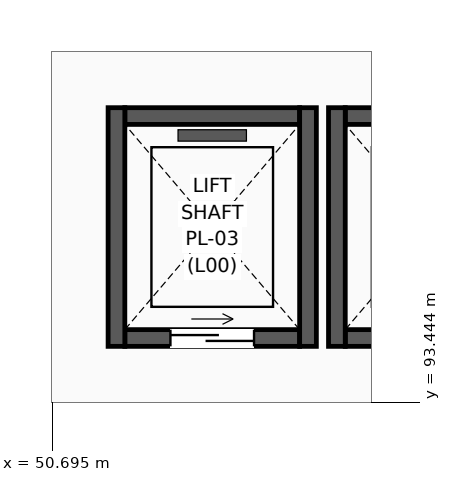
"""IFC4 building model, lengths in metres.
Left out: names, types, materials, properties, quantities, classifications, styles, units other than length and angle.
Written with IfcOpenShell. Run it as: python <this file> out.ifc"""

import sys

from ifc_helpers import new_model, si_unit, direction, frame, frame_2d, origin, place, context, subcontext, project, spatial, rectangle, extrude, element, fill, save


model = new_model("IFC4")
c1 = context("Model", 3, precision=1e-05, world=origin(), true_north=direction((0.0, 1.0)))
c2 = subcontext(c1, "Body", "Model", "MODEL_VIEW")
j1 = project(units=[si_unit("LENGTHUNIT", "METRE"), si_unit("PLANEANGLEUNIT", "RADIAN")], contexts=[c1])
p1 = place(None, origin())
s1 = spatial("IfcSite", under=j1, at=p1, CompositionType="ELEMENT")
p2 = place(p1, origin())
s2 = spatial("IfcBuilding", under=s1, at=p2, CompositionType="ELEMENT")
p3 = place(p2, origin())
s3 = spatial("IfcBuildingStorey", under=s2, at=p3, CompositionType="ELEMENT", Elevation=0.0)
p4 = place(p3, frame((51.65, 94.29, 0.0), z_axis=(0.0, 0.0, 1.0), x_axis=(1.0, 0.0, 0.0)))
e1 = element("IfcWall", 1, at=p4, inside=s3, PredefinedType="SOLIDWALL", context=c2, shape_type="SweptSolid", body=[
    extrude(rectangle(XDim=2.3, YDim=0.22, at=frame_2d((1.15, 0.0))), origin(), (0.0, 0.0, 1.0), 5.105),
])
p5 = place(p4, frame((0.6, 0.0, 0.0)))
e2 = element("IfcOpeningElement", 2, at=p5, cuts=e1, PredefinedType="OPENING", context=c2, shape_type="SweptSolid", body=[
    extrude(rectangle(XDim=1.1, YDim=2.2, at=frame_2d((0.55, 1.1))), frame((0.0, 0.12, 0.0), z_axis=(0.0, -1.0, 0.0), x_axis=(1.0, 0.0, 0.0)), (0.0, 0.0, 1.0), 0.24),
])
p6 = place(p3, frame((51.65, 97.21, 0.0), z_axis=(0.0, 0.0, 1.0), x_axis=(1.0, 0.0, 0.0)))
e3 = element("IfcWall", 3, at=p6, inside=s3, PredefinedType="SOLIDWALL", context=c2, shape_type="SweptSolid", body=[
    extrude(rectangle(XDim=2.3, YDim=0.22, at=frame_2d((1.15, 0.0))), origin(), (0.0, 0.0, 1.0), 5.105),
])
for number, where, z_axis, x_axis in (
    (4, (51.54, 94.18, 0.0), (0.0, 0.0, 1.0), (0.0, 1.0, 0.0)),
    (5, (54.06, 94.18, 0.0), (0.0, 0.0, 1.0), (0.0, 1.0, 0.0)),
):
    element("IfcWall", number, at=place(p3, frame(where, z_axis=z_axis, x_axis=x_axis)), inside=s3, PredefinedType="SOLIDWALL", context=c2, shape_type="SweptSolid", body=[
        extrude(rectangle(XDim=3.14, YDim=0.22, at=frame_2d((1.57, 0.0))), origin(), (0.0, 0.0, 1.0), 5.105),
    ])
p7 = place(p3, frame((54.55, 94.29, 0.0), z_axis=(0.0, 0.0, 1.0), x_axis=(1.0, 0.0, 0.0)))
e6 = element("IfcWall", 6, at=p7, inside=s3, PredefinedType="SOLIDWALL", context=c2, shape_type="SweptSolid", body=[
    extrude(rectangle(XDim=2.3, YDim=0.22, at=frame_2d((1.15, 0.0))), origin(), (0.0, 0.0, 1.0), 5.105),
])
p8 = place(p7, frame((0.6, 0.0, 0.0)))
e7 = element("IfcOpeningElement", 7, at=p8, cuts=e6, PredefinedType="OPENING", context=c2, shape_type="SweptSolid", body=[
    extrude(rectangle(XDim=1.1, YDim=2.2, at=frame_2d((0.55, 1.1))), frame((0.0, 0.12, 0.0), z_axis=(0.0, -1.0, 0.0), x_axis=(1.0, 0.0, 0.0)), (0.0, 0.0, 1.0), 0.24),
])
p9 = place(p3, frame((54.55, 97.21, 0.0), z_axis=(0.0, 0.0, 1.0), x_axis=(1.0, 0.0, 0.0)))
e8 = element("IfcWall", 8, at=p9, inside=s3, PredefinedType="SOLIDWALL", context=c2, shape_type="SweptSolid", body=[
    extrude(rectangle(XDim=2.3, YDim=0.22, at=frame_2d((1.15, 0.0))), origin(), (0.0, 0.0, 1.0), 5.105),
])
p10 = place(p3, frame((54.44, 94.18, 0.0), z_axis=(0.0, 0.0, 1.0), x_axis=(0.0, 1.0, 0.0)))
e9 = element("IfcWall", 9, at=p10, inside=s3, PredefinedType="SOLIDWALL", context=c2, shape_type="SweptSolid", body=[
    extrude(rectangle(XDim=3.14, YDim=0.22, at=frame_2d((1.57, 0.0))), origin(), (0.0, 0.0, 1.0), 5.105),
])
p11 = place(p5, origin())
e10 = element("IfcDoor", 10, at=p11, inside=s3, OperationType="SLIDING_TO_LEFT", PredefinedType="DOOR", context=c2, shape_type="SweptSolid", body=[
    extrude(rectangle(XDim=1.1, YDim=2.2, at=frame_2d((0.55, 1.1))), frame((0.0, 0.025, 0.0), z_axis=(0.0, -1.0, 0.0), x_axis=(1.0, 0.0, 0.0)), (0.0, 0.0, 1.0), 0.05),
])
fill(e2, e10)
save(model, sys.argv[1])
